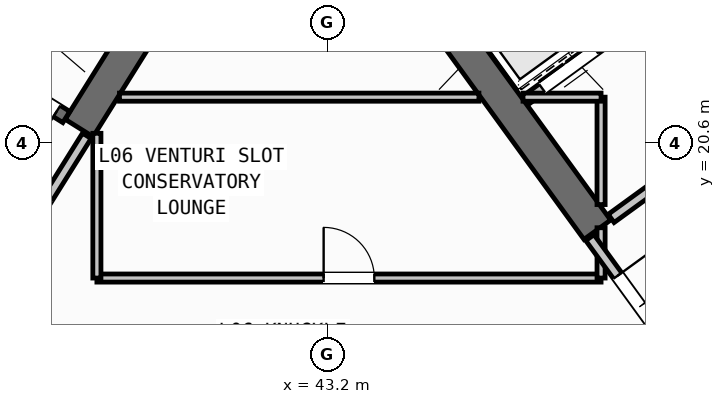
"""IFC4 building model, lengths in metres.
Left out: names, types, materials, properties, quantities, classifications, styles, units other than length and angle.
Written with IfcOpenShell. Run it as: python <this file> out.ifc"""

import sys

from ifc_helpers import new_model, si_unit, direction, frame, frame_2d, origin, place, context, subcontext, project, spatial, rectangle, extrude, source, transform, mapped, element, fill, save


model = new_model("IFC4")
c1 = context("Model", 3, precision=1e-05, world=origin(), true_north=direction((0.0, 1.0)))
c2 = subcontext(c1, "Body", "Model", "MODEL_VIEW")
j1 = project(units=[si_unit("LENGTHUNIT", "METRE"), si_unit("PLANEANGLEUNIT", "RADIAN")], contexts=[c1])
p1 = place(None, origin())
s1 = spatial("IfcSite", under=j1, at=p1, CompositionType="ELEMENT")
p2 = place(p1, origin())
s2 = spatial("IfcBuilding", under=s1, at=p2, CompositionType="ELEMENT")
p3 = place(p2, frame((0.0, 0.0, 27.6)))
s3 = spatial("IfcBuildingStorey", under=s2, at=p3, CompositionType="ELEMENT", Elevation=27.6)
p4 = place(p3, frame((40.168, 23.88, 0.0), z_axis=(0.0, 0.0, 1.0), x_axis=(-0.529893103397, -0.8480644427, 0.0)))
e1 = element("IfcWall", 1, at=p4, inside=s3, PredefinedType="SHEAR", context=c2, shape_type="SweptSolid", body=[
    extrude(rectangle(XDim=3.525, YDim=0.65, at=frame_2d((1.763, 0.0))), origin(), (0.0, 0.0, 1.0), 3.35),
])
p5 = place(p3, frame((48.526, 18.884, 0.0), z_axis=(0.0, 0.0, 1.0), x_axis=(-0.58777996584, 0.809020835181, 0.0)))
e2 = element("IfcWall", 2, at=p5, inside=s3, PredefinedType="SHEAR", context=c2, shape_type="SweptSolid", body=[
    extrude(rectangle(XDim=6.375, YDim=0.65, at=frame_2d((3.188, 0.0))), origin(), (0.0, 0.0, 1.0), 3.35),
])
p6 = place(p3, frame((38.046, 21.108, 0.0), z_axis=(0.0, 0.0, 1.0), x_axis=(-0.848054434086, 0.529909121291, 0.0)))
e3 = element("IfcWall", 3, at=p6, inside=s3, PredefinedType="SHEAR", context=c2, shape_type="SweptSolid", body=[
    extrude(rectangle(XDim=7.33, YDim=0.26, at=frame_2d((3.665, 0.0))), origin(), (0.0, 0.0, 1.0), 3.35),
])
p7 = place(p6, frame((0.22, 0.0, 0.0)))
e4 = element("IfcOpeningElement", 4, at=p7, cuts=e3, PredefinedType="OPENING", context=c2, shape_type="SweptSolid", body=[
    extrude(rectangle(XDim=1.1, YDim=2.1, at=frame_2d((0.55, 1.05))), frame((0.0, 0.14, 0.0), z_axis=(0.0, -1.0, 0.0), x_axis=(1.0, 0.0, 0.0)), (0.0, 0.0, 1.0), 0.28),
])
p8 = place(p3, frame((47.106, 21.437, 0.0), z_axis=(0.0, 0.0, 1.0), x_axis=(0.809012514015, 0.58779141893, 0.0)))
e5 = element("IfcWall", 5, at=p8, inside=s3, PredefinedType="STANDARD", context=c2, shape_type="SweptSolid", body=[
    extrude(rectangle(XDim=3.398, YDim=0.2, at=frame_2d((1.699, 0.0))), origin(), (0.0, 0.0, 1.0), 3.34),
])
p9 = place(p8, frame((0.408, 0.0, 0.0)))
e6 = element("IfcOpeningElement", 6, at=p9, cuts=e5, PredefinedType="OPENING", context=c2, shape_type="SweptSolid", body=[
    extrude(rectangle(XDim=1.3, YDim=2.2, at=frame_2d((0.65, 1.1))), frame((0.0, 0.11, 0.0), z_axis=(0.0, -1.0, 0.0), x_axis=(1.0, 0.0, 0.0)), (0.0, 0.0, 1.0), 0.22),
])
p10 = place(p3, frame((48.799, 19.107, 0.0), z_axis=(0.0, 0.0, 1.0), x_axis=(0.809012959416, 0.587790805897, 0.0)))
e7 = element("IfcWall", 7, at=p10, inside=s3, PredefinedType="STANDARD", context=c2, shape_type="SweptSolid", body=[
    extrude(rectangle(XDim=5.718, YDim=0.2, at=frame_2d((2.859, 0.0))), origin(), (0.0, 0.0, 1.0), 3.34),
])
p11 = place(p10, frame((2.498, 0.0, 0.0)))
e8 = element("IfcOpeningElement", 8, at=p11, cuts=e7, PredefinedType="OPENING", context=c2, shape_type="SweptSolid", body=[
    extrude(rectangle(XDim=1.15, YDim=2.1, at=frame_2d((0.575, 1.05))), frame((0.0, 0.11, 0.0), z_axis=(0.0, -1.0, 0.0), x_axis=(1.0, 0.0, 0.0)), (0.0, 0.0, 1.0), 0.22),
])
p12 = place(p3, frame((38.451, 20.737, 0.0), z_axis=(0.0, 0.0, 1.0), x_axis=(-0.529924799939, -0.848044637038, 0.0)))
e9 = element("IfcWall", 9, at=p12, inside=s3, PredefinedType="STANDARD", context=c2, shape_type="SweptSolid", body=[
    extrude(rectangle(XDim=2.96, YDim=0.2, at=frame_2d((1.48, 0.0))), origin(), (0.0, 0.0, 1.0), 3.34),
])
p13 = place(p12, frame((1.46, 0.0, 0.0)))
e10 = element("IfcOpeningElement", 10, at=p13, cuts=e9, PredefinedType="OPENING", context=c2, shape_type="SweptSolid", body=[
    extrude(rectangle(XDim=0.86, YDim=2.05, at=frame_2d((0.43, 1.025))), frame((0.0, 0.11, 0.0), z_axis=(0.0, -1.0, 0.0), x_axis=(1.0, 0.0, 0.0)), (0.0, 0.0, 1.0), 0.22),
])
p14 = place(p3, frame((38.65, 17.93, 0.0), z_axis=(0.0, 0.0, 1.0), x_axis=(1.0, 0.0, 0.0)))
e11 = element("IfcWall", 11, at=p14, inside=s3, PredefinedType="PARTITIONING", context=c2, shape_type="SweptSolid", body=[
    extrude(rectangle(XDim=9.95, YDim=0.16, at=frame_2d((4.975, 0.0))), origin(), (0.0, 0.0, 1.0), 3.34),
])
p15 = place(p14, frame((4.475, 0.0, 0.0)))
e12 = element("IfcOpeningElement", 12, at=p15, cuts=e11, PredefinedType="OPENING", context=c2, shape_type="SweptSolid", body=[
    extrude(rectangle(XDim=1.0, YDim=2.1, at=frame_2d((0.5, 1.05))), frame((0.0, 0.09, 0.0), z_axis=(0.0, -1.0, 0.0), x_axis=(1.0, 0.0, 0.0)), (0.0, 0.0, 1.0), 0.18),
])
p16 = place(p3, frame((38.65, 17.93, 0.0), z_axis=(0.0, 0.0, 1.0), x_axis=(0.0, 1.0, 0.0)))
e13 = element("IfcWall", 13, at=p16, inside=s3, PredefinedType="PARTITIONING", context=c2, shape_type="SweptSolid", body=[
    extrude(rectangle(XDim=2.857, YDim=0.16, at=frame_2d((1.428, 0.0))), origin(), (0.0, 0.0, 1.0), 3.34),
])
p17 = place(p3, frame((48.6, 17.93, 0.0), z_axis=(0.0, 0.0, 1.0), x_axis=(0.0, 1.0, 0.0)))
e14 = element("IfcWall", 14, at=p17, inside=s3, PredefinedType="PARTITIONING", context=c2, shape_type="SweptSolid", body=[
    extrude(rectangle(XDim=0.993, YDim=0.16, at=frame_2d((0.496, 0.0))), origin(), (0.0, 0.0, 1.0), 3.34),
])
p18 = place(p3, frame((48.6, 19.38, 0.0), z_axis=(0.0, 0.0, 1.0), x_axis=(0.0, 1.0, 0.0)))
e15 = element("IfcWall", 15, at=p18, inside=s3, PredefinedType="PARTITIONING", context=c2, shape_type="SweptSolid", body=[
    extrude(rectangle(XDim=2.12, YDim=0.16, at=frame_2d((1.06, 0.0))), origin(), (0.0, 0.0, 1.0), 3.34),
])
p19 = place(p3, frame((39.095, 21.5, 0.0), z_axis=(0.0, 0.0, 1.0), x_axis=(1.0, 0.0, 0.0)))
e16 = element("IfcWall", 16, at=p19, inside=s3, PredefinedType="PARTITIONING", context=c2, shape_type="SweptSolid", body=[
    extrude(rectangle(XDim=7.094, YDim=0.16, at=frame_2d((3.547, 0.0))), origin(), (0.0, 0.0, 1.0), 3.34),
])
p20 = place(p3, frame((47.06, 21.5, 0.0), z_axis=(0.0, 0.0, 1.0), x_axis=(1.0, 0.0, 0.0)))
e17 = element("IfcWall", 17, at=p20, inside=s3, PredefinedType="PARTITIONING", context=c2, shape_type="SweptSolid", body=[
    extrude(rectangle(XDim=1.54, YDim=0.16, at=frame_2d((0.77, 0.0))), origin(), (0.0, 0.0, 1.0), 3.34),
])
p21 = place(p3, frame((50.119, 16.333, 0.0), z_axis=(0.0, 0.0, 1.0), x_axis=(-0.587749856981, 0.809042709391, 0.0)))
e18 = element("IfcWall", 18, at=p21, inside=s3, PredefinedType="STANDARD", context=c2, shape_type="SweptSolid", body=[
    extrude(rectangle(XDim=2.96, YDim=0.2, at=frame_2d((1.48, 0.0))), origin(), (0.0, 0.0, 1.0), 3.34),
])
p22 = place(p21, frame((0.53, 0.0, 0.0)))
e19 = element("IfcOpeningElement", 19, at=p22, cuts=e18, PredefinedType="OPENING", context=c2, shape_type="SweptSolid", body=[
    extrude(rectangle(XDim=1.5, YDim=2.15, at=frame_2d((0.75, 1.075))), frame((0.0, 0.11, 0.0), z_axis=(0.0, -1.0, 0.0), x_axis=(1.0, 0.0, 0.0)), (0.0, 0.0, 1.0), 0.22),
])
m1 = source(origin(), c2, "Body", "SweptSolid", [
    extrude(rectangle(XDim=1.1, YDim=2.1, at=frame_2d((0.55, 1.05))), frame((0.0, 0.025, 0.0), z_axis=(0.0, -1.0, 0.0), x_axis=(1.0, 0.0, 0.0)), (0.0, 0.0, 1.0), 0.05),
])
p23 = place(p7, origin())
e20 = element("IfcDoor", 20, at=p23, inside=s3, OperationType="SINGLE_SWING_LEFT", PredefinedType="DOOR", context=c2, shape_type="MappedRepresentation", body=[
    mapped(m1, transform((0.0, 0.0, 0.0), scale=1.0)),
])
fill(e4, e20)
m2 = source(origin(), c2, "Body", "SweptSolid", [
    extrude(rectangle(XDim=1.3, YDim=2.2, at=frame_2d((0.65, 1.1))), frame((0.0, 0.025, 0.0), z_axis=(0.0, -1.0, 0.0), x_axis=(1.0, 0.0, 0.0)), (0.0, 0.0, 1.0), 0.05),
])
p24 = place(p9, origin())
e21 = element("IfcDoor", 21, at=p24, inside=s3, OperationType="DOUBLE_DOOR_SLIDING", PredefinedType="DOOR", context=c2, shape_type="MappedRepresentation", body=[
    mapped(m2, transform((0.0, 0.0, 0.0), scale=1.0)),
])
fill(e6, e21)
m3 = source(origin(), c2, "Body", "SweptSolid", [
    extrude(rectangle(XDim=1.0, YDim=2.1, at=frame_2d((0.5, 1.05))), frame((0.0, 0.025, 0.0), z_axis=(0.0, -1.0, 0.0), x_axis=(1.0, 0.0, 0.0)), (0.0, 0.0, 1.0), 0.05),
])
p25 = place(p15, origin())
e22 = element("IfcDoor", 22, at=p25, inside=s3, OperationType="SINGLE_SWING_LEFT", PredefinedType="DOOR", context=c2, shape_type="MappedRepresentation", body=[
    mapped(m3, transform((0.0, 0.0, 0.0), scale=1.0)),
])
fill(e12, e22)
m4 = source(origin(), c2, "Body", "SweptSolid", [
    extrude(rectangle(XDim=1.5, YDim=2.15, at=frame_2d((0.75, 1.075))), frame((0.0, 0.025, 0.0), z_axis=(0.0, -1.0, 0.0), x_axis=(1.0, 0.0, 0.0)), (0.0, 0.0, 1.0), 0.05),
])
p26 = place(p22, frame((1.5, 0.0, 0.0), z_axis=(0.0, 0.0, 1.0), x_axis=(-1.0, 0.0, 0.0)))
e23 = element("IfcDoor", 23, at=p26, inside=s3, OperationType="DOUBLE_DOOR_SINGLE_SWING", PredefinedType="DOOR", context=c2, shape_type="MappedRepresentation", body=[
    mapped(m4, transform((0.0, 0.0, 0.0), scale=1.0)),
])
fill(e19, e23)
save(model, sys.argv[1])
